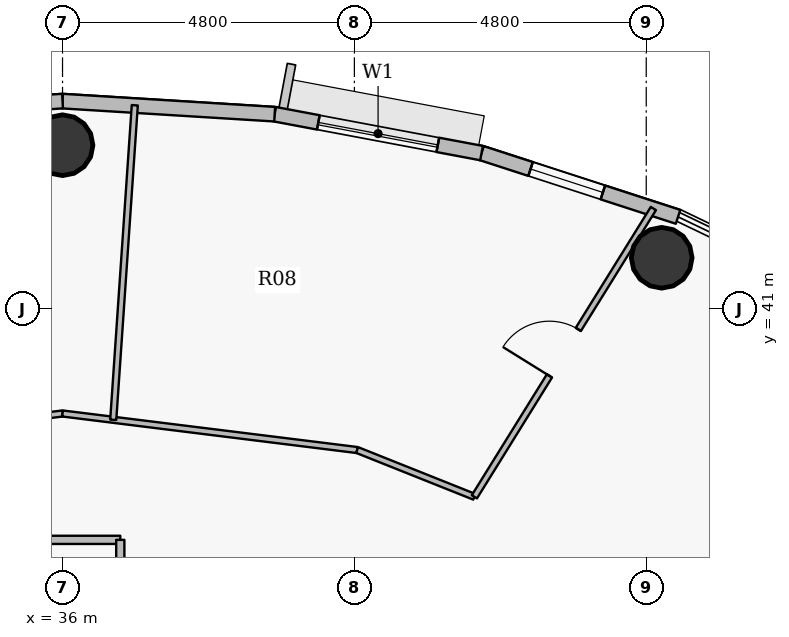
"""IFC4 building model, lengths in metres.
Left out: names, types, materials, properties, quantities, classifications, styles, units other than length and angle.
Written with IfcOpenShell. Run it as: python <this file> out.ifc"""

import sys

from ifc_helpers import new_model, si_unit, direction, frame, frame_2d, origin, origin_2d, place, context, subcontext, project, spatial, rectangle, hollow_circle, extrude, source, transform, mapped, element, fill, save


model = new_model("IFC4")
c1 = context("Model", 3, precision=1e-05, world=origin(), true_north=direction((0.0, 1.0)))
c2 = subcontext(c1, "Body", "Model", "MODEL_VIEW")
j1 = project(units=[si_unit("LENGTHUNIT", "METRE"), si_unit("PLANEANGLEUNIT", "RADIAN")], contexts=[c1])
p1 = place(None, origin())
s1 = spatial("IfcSite", under=j1, at=p1, CompositionType="ELEMENT")
p2 = place(p1, origin())
s2 = spatial("IfcBuilding", under=s1, at=p2, CompositionType="ELEMENT")
p3 = place(p2, frame((0.0, 0.0, 314.25)))
s3 = spatial("IfcBuildingStorey", under=s2, at=p3, CompositionType="ELEMENT", Elevation=314.25)
for number, where, z_axis, x_axis in (
    (1, (45.854, 41.839, 0.0), (0.0, 0.0, 1.0), (1.0, 0.0, 0.0)),
    (2, (36.0, 43.69, 0.0), (0.0, 0.0, 1.0), (1.0, 0.0, 0.0)),
):
    element("IfcColumn", number, at=place(p3, frame(where, z_axis=z_axis, x_axis=x_axis)), inside=s3, PredefinedType="COLUMN", context=c2, shape_type="SweptSolid", body=[
        extrude(hollow_circle(Radius=0.5, WallThickness=0.032, at=origin_2d()), origin(), (0.0, 0.0, 1.0), 3.75),
    ])
p4 = place(p3, frame((42.891, 43.56, 0.0), z_axis=(0.0, 0.0, 1.0), x_axis=(0.95123136723, -0.308478339592, 0.0)))
e3 = element("IfcWall", 3, at=p4, inside=s3, PredefinedType="SOLIDWALL", context=c2, shape_type="SweptSolid", body=[
    extrude(rectangle(XDim=3.398, YDim=0.24, at=frame_2d((1.699, 0.0))), origin(), (0.0, 0.0, 1.0), 3.45),
])
p5 = place(p4, frame((0.848, 0.0, 0.9)))
e4 = element("IfcOpeningElement", 4, at=p5, cuts=e3, PredefinedType="OPENING", context=c2, shape_type="SweptSolid", body=[
    extrude(rectangle(XDim=1.25, YDim=1.65, at=origin_2d()), frame((0.625, 0.13, 0.825), z_axis=(0.0, -1.0, 0.0), x_axis=(1.0, 0.0, 0.0)), (0.0, 0.0, 1.0), 0.26),
])
p6 = place(p3, frame((39.489, 44.2, 0.0), z_axis=(0.0, 0.0, 1.0), x_axis=(0.982782655757, -0.184765395959, 0.0)))
e5 = element("IfcWall", 5, at=p6, inside=s3, PredefinedType="SOLIDWALL", context=c2, shape_type="SweptSolid", body=[
    extrude(rectangle(XDim=3.462, YDim=0.24, at=frame_2d((1.731, 0.0))), origin(), (0.0, 0.0, 1.0), 3.45),
])
p7 = place(p6, frame((0.731, 0.0, 0.9)))
e6 = element("IfcOpeningElement", 6, at=p7, cuts=e5, PredefinedType="OPENING", context=c2, shape_type="SweptSolid", body=[
    extrude(rectangle(XDim=2.0, YDim=1.75, at=origin_2d()), frame((1.0, 0.13, 0.875), z_axis=(0.0, -1.0, 0.0), x_axis=(1.0, 0.0, 0.0)), (0.0, 0.0, 1.0), 0.26),
])
p8 = place(p3, frame((36.0, 44.415, 0.0), z_axis=(0.0, 0.0, 1.0), x_axis=(0.998104946479, -0.061534671648, 0.0)))
e7 = element("IfcWall", 7, at=p8, inside=s3, PredefinedType="SOLIDWALL", context=c2, shape_type="SweptSolid", body=[
    extrude(rectangle(XDim=3.495, YDim=0.24, at=frame_2d((1.748, 0.0))), origin(), (0.0, 0.0, 1.0), 3.45),
])
p9 = place(p3, frame((32.511, 44.2, 0.0), z_axis=(0.0, 0.0, 1.0), x_axis=(0.998104946479, 0.061534671648, 0.0)))
e8 = element("IfcWall", 8, at=p9, inside=s3, PredefinedType="SOLIDWALL", context=c2, shape_type="SweptSolid", body=[
    extrude(rectangle(XDim=3.495, YDim=0.24, at=frame_2d((1.748, 0.0))), origin(), (0.0, 0.0, 1.0), 3.45),
])
p10 = place(p9, frame((1.123, 0.0, 0.9)))
e9 = element("IfcOpeningElement", 9, at=p10, cuts=e8, PredefinedType="OPENING", context=c2, shape_type="SweptSolid", body=[
    extrude(rectangle(XDim=1.25, YDim=1.65, at=origin_2d()), frame((0.625, 0.13, 0.825), z_axis=(0.0, -1.0, 0.0), x_axis=(1.0, 0.0, 0.0)), (0.0, 0.0, 1.0), 0.26),
])
p11 = place(p3, frame((31.155, 38.677, 0.0), z_axis=(0.0, 0.0, 1.0), x_axis=(0.99239360053, 0.123105408601, 0.0)))
e10 = element("IfcWall", 10, at=p11, inside=s3, PredefinedType="PARTITIONING", context=c2, shape_type="SweptSolid", body=[
    extrude(rectangle(XDim=4.883, YDim=0.1, at=frame_2d((2.441, 0.0))), origin(), (0.0, 0.0, 1.0), 2.985),
])
p12 = place(p11, frame((3.203, 0.0, 0.0)))
e11 = element("IfcOpeningElement", 11, at=p12, cuts=e10, PredefinedType="OPENING", context=c2, shape_type="SweptSolid", body=[
    extrude(rectangle(XDim=0.9, YDim=2.1, at=origin_2d()), frame((0.45, 0.06, 1.05), z_axis=(0.0, -1.0, 0.0), x_axis=(1.0, 0.0, 0.0)), (0.0, 0.0, 1.0), 0.12),
])
p13 = place(p3, frame((35.05, 37.2, 0.0), z_axis=(0.0, 0.0, 1.0), x_axis=(1.0, 0.0, 0.0)))
e12 = element("IfcWall", 12, at=p13, inside=s3, PredefinedType="PARTITIONING", context=c2, shape_type="SweptSolid", body=[
    extrude(rectangle(XDim=1.9, YDim=0.135, at=frame_2d((0.95, 0.0))), origin(), (0.0, 0.0, 1.0), 2.985),
])
p14 = place(p3, frame((36.0, 39.278, 0.0), z_axis=(0.0, 0.0, 1.0), x_axis=(0.992394358254, -0.123099300182, 0.0)))
e13 = element("IfcWall", 13, at=p14, inside=s3, PredefinedType="PARTITIONING", context=c2, shape_type="SweptSolid", body=[
    extrude(rectangle(XDim=4.883, YDim=0.1, at=frame_2d((2.441, 0.0))), origin(), (0.0, 0.0, 1.0), 2.985),
])
p15 = place(p3, frame((36.834, 39.175, 0.0), z_axis=(0.0, 0.0, 1.0), x_axis=(0.068331768218, 0.997662653131, 0.0)))
e14 = element("IfcWall", 14, at=p15, inside=s3, PredefinedType="PARTITIONING", context=c2, shape_type="SweptSolid", body=[
    extrude(rectangle(XDim=5.184, YDim=0.1, at=frame_2d((2.592, 0.0))), origin(), (0.0, 0.0, 1.0), 2.935),
])
p16 = place(p3, frame((36.95, 35.65, 0.0), z_axis=(0.0, 0.0, 1.0), x_axis=(0.0, 1.0, 0.0)))
e15 = element("IfcWall", 15, at=p16, inside=s3, PredefinedType="PARTITIONING", context=c2, shape_type="SweptSolid", body=[
    extrude(rectangle(XDim=1.55, YDim=0.135, at=frame_2d((0.775, 0.0))), origin(), (0.0, 0.0, 1.0), 3.45),
])
p17 = place(p3, frame((40.845, 38.677, 0.0), z_axis=(0.0, 0.0, 1.0), x_axis=(0.928792693453, -0.370599693184, 0.0)))
e16 = element("IfcWall", 16, at=p17, inside=s3, PredefinedType="PARTITIONING", context=c2, shape_type="SweptSolid", body=[
    extrude(rectangle(XDim=2.076, YDim=0.1, at=frame_2d((1.038, 0.0))), origin(), (0.0, 0.0, 1.0), 3.45),
])
p18 = place(p3, frame((42.773, 37.908, 0.0), z_axis=(0.0, 0.0, 1.0), x_axis=(0.527527282505, 0.849538089913, 0.0)))
e17 = element("IfcWall", 17, at=p18, inside=s3, PredefinedType="PARTITIONING", context=c2, shape_type="SweptSolid", body=[
    extrude(rectangle(XDim=5.581, YDim=0.1, at=frame_2d((2.791, 0.0))), origin(), (0.0, 0.0, 1.0), 2.935),
])
p19 = place(p18, frame((2.34, 0.0, 0.0)))
e18 = element("IfcOpeningElement", 18, at=p19, cuts=e17, PredefinedType="OPENING", context=c2, shape_type="SweptSolid", body=[
    extrude(rectangle(XDim=0.9, YDim=2.1, at=origin_2d()), frame((0.45, 0.06, 1.05), z_axis=(0.0, -1.0, 0.0), x_axis=(1.0, 0.0, 0.0)), (0.0, 0.0, 1.0), 0.12),
])
m1 = source(origin(), c2, "Body", "SweptSolid", [
    extrude(rectangle(XDim=1.25, YDim=1.65, at=origin_2d()), frame((0.625, 0.03, 0.825), z_axis=(0.0, -1.0, 0.0), x_axis=(1.0, 0.0, 0.0)), (0.0, 0.0, 1.0), 0.06),
])
p20 = place(p5, origin())
e19 = element("IfcWindow", 19, at=p20, inside=s3, PartitioningType="SINGLE_PANEL", PredefinedType="WINDOW", context=c2, shape_type="MappedRepresentation", body=[
    mapped(m1, transform((0.0, 0.0, 0.0), x_axis=(1.0, 0.0, 0.0), y_axis=(0.0, 1.0, 0.0), z_axis=(0.0, 0.0, 1.0), scale=1.0)),
])
fill(e4, e19)
m2 = source(origin(), c2, "Body", "SweptSolid", [
    extrude(rectangle(XDim=2.0, YDim=1.75, at=origin_2d()), frame((1.0, 0.03, 0.875), z_axis=(0.0, -1.0, 0.0), x_axis=(1.0, 0.0, 0.0)), (0.0, 0.0, 1.0), 0.06),
])
p21 = place(p7, origin())
e20 = element("IfcWindow", 20, at=p21, inside=s3, PartitioningType="DOUBLE_PANEL_VERTICAL", PredefinedType="WINDOW", context=c2, shape_type="MappedRepresentation", body=[
    mapped(m2, transform((0.0, 0.0, 0.0), x_axis=(1.0, 0.0, 0.0), y_axis=(0.0, 1.0, 0.0), z_axis=(0.0, 0.0, 1.0), scale=1.0)),
])
fill(e6, e20)
m3 = source(origin(), c2, "Body", "SweptSolid", [
    extrude(rectangle(XDim=0.9, YDim=2.1, at=origin_2d()), frame((0.45, 0.025, 1.05), z_axis=(0.0, -1.0, 0.0), x_axis=(1.0, 0.0, 0.0)), (0.0, 0.0, 1.0), 0.05),
])
p22 = place(p19, origin())
e21 = element("IfcDoor", 21, at=p22, inside=s3, OperationType="SINGLE_SWING_LEFT", PredefinedType="DOOR", context=c2, shape_type="MappedRepresentation", body=[
    mapped(m3, transform((0.0, 0.0, 0.0), x_axis=(1.0, 0.0, 0.0), y_axis=(0.0, 1.0, 0.0), z_axis=(0.0, 0.0, 1.0), scale=1.0)),
])
fill(e18, e21)
save(model, sys.argv[1])
